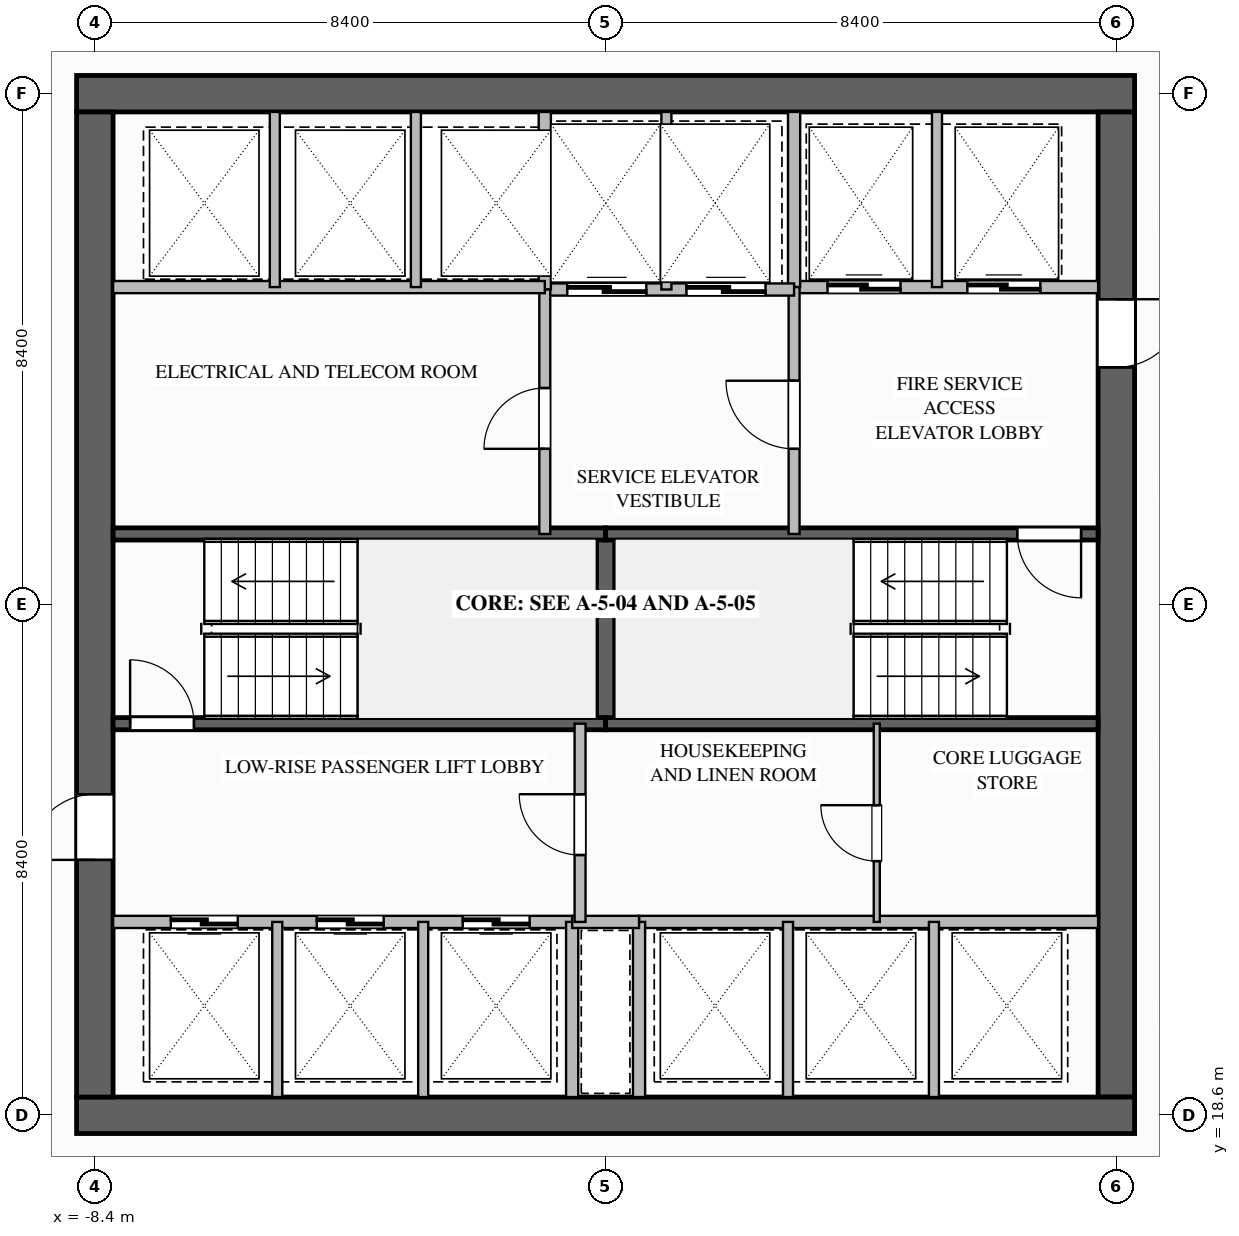
"""IFC4 building model, lengths in metres.
Left out: names, types, materials, properties, quantities, classifications, styles, units other than length and angle.
Written with IfcOpenShell. Run it as: python <this file> out.ifc"""

import sys

from ifc_helpers import new_model, si_unit, direction, frame, frame_2d, origin, place, context, subcontext, project, spatial, rectangle, extrude, element, fill, save


model = new_model("IFC4")
c1 = context("Model", 3, precision=1e-05, world=origin(), true_north=direction((0.0, 1.0)))
c2 = subcontext(c1, "Body", "Model", "MODEL_VIEW")
j1 = project(units=[si_unit("LENGTHUNIT", "METRE"), si_unit("PLANEANGLEUNIT", "RADIAN")], contexts=[c1])
p1 = place(None, origin())
s1 = spatial("IfcSite", under=j1, at=p1, CompositionType="ELEMENT")
p2 = place(p1, origin())
s2 = spatial("IfcBuilding", under=s1, at=p2, CompositionType="ELEMENT")
p3 = place(p2, frame((0.0, 0.0, 43.7)))
s3 = spatial("IfcBuildingStorey", under=s2, at=p3, CompositionType="ELEMENT", Elevation=43.7)
p4 = place(p3, frame((-8.7, 35.4, 0.0), z_axis=(0.0, 0.0, 1.0), x_axis=(1.0, 0.0, 0.0)))
e1 = element("IfcWall", 1, at=p4, inside=s3, PredefinedType="SHEAR", context=c2, shape_type="SweptSolid", body=[
    extrude(rectangle(XDim=17.4, YDim=0.6, at=frame_2d((8.7, 0.0))), origin(), (0.0, 0.0, 1.0), 3.5),
])
p5 = place(p3, frame((8.4, 35.1, 0.0), z_axis=(0.0, 0.0, 1.0), x_axis=(0.0, -1.0, 0.0)))
e2 = element("IfcWall", 2, at=p5, inside=s3, PredefinedType="SHEAR", context=c2, shape_type="SweptSolid", body=[
    extrude(rectangle(XDim=16.2, YDim=0.6, at=frame_2d((8.1, 0.0))), origin(), (0.0, 0.0, 1.0), 3.5),
])
p6 = place(p5, frame((3.08, 0.0, 0.0)))
e3 = element("IfcOpeningElement", 3, at=p6, cuts=e2, PredefinedType="OPENING", context=c2, shape_type="SweptSolid", body=[
    extrude(rectangle(XDim=1.12, YDim=2.1, at=frame_2d((0.56, 1.05))), frame((0.0, 0.31, 0.0), z_axis=(0.0, -1.0, 0.0), x_axis=(1.0, 0.0, 0.0)), (0.0, 0.0, 1.0), 0.62),
])
p7 = place(p3, frame((8.7, 18.6, 0.0), z_axis=(0.0, 0.0, 1.0), x_axis=(-1.0, 0.0, 0.0)))
e4 = element("IfcWall", 4, at=p7, inside=s3, PredefinedType="SHEAR", context=c2, shape_type="SweptSolid", body=[
    extrude(rectangle(XDim=17.4, YDim=0.6, at=frame_2d((8.7, 0.0))), origin(), (0.0, 0.0, 1.0), 3.5),
])
p8 = place(p3, frame((-8.4, 18.9, 0.0), z_axis=(0.0, 0.0, 1.0), x_axis=(0.0, 1.0, 0.0)))
e5 = element("IfcWall", 5, at=p8, inside=s3, PredefinedType="SHEAR", context=c2, shape_type="SweptSolid", body=[
    extrude(rectangle(XDim=16.2, YDim=0.6, at=frame_2d((8.1, 0.0))), origin(), (0.0, 0.0, 1.0), 3.5),
])
p9 = place(p8, frame((3.9, 0.0, 0.0)))
e6 = element("IfcOpeningElement", 6, at=p9, cuts=e5, PredefinedType="OPENING", context=c2, shape_type="SweptSolid", body=[
    extrude(rectangle(XDim=1.08, YDim=2.04, at=frame_2d((0.54, 1.02))), frame((0.0, 0.31, 0.0), z_axis=(0.0, -1.0, 0.0), x_axis=(1.0, 0.0, 0.0)), (0.0, 0.0, 1.0), 0.62),
])
p10 = place(p3, frame((0.0, 25.04, 0.0), z_axis=(0.0, 0.0, 1.0), x_axis=(0.0, 1.0, 0.0)))
e7 = element("IfcWall", 7, at=p10, inside=s3, PredefinedType="SOLIDWALL", context=c2, shape_type="SweptSolid", body=[
    extrude(rectangle(XDim=3.12, YDim=0.3, at=frame_2d((1.56, 0.0))), origin(), (0.0, 0.0, 1.0), 3.24),
])
p11 = place(p3, frame((-8.1, 25.04, 0.0), z_axis=(0.0, 0.0, 1.0), x_axis=(1.0, 0.0, 0.0)))
e8 = element("IfcWall", 8, at=p11, inside=s3, PredefinedType="SOLIDWALL", context=c2, shape_type="SweptSolid", body=[
    extrude(rectangle(XDim=8.1, YDim=0.2, at=frame_2d((4.05, 0.0))), origin(), (0.0, 0.0, 1.0), 3.24),
])
p12 = place(p11, frame((0.28, 0.0, 0.0)))
e9 = element("IfcOpeningElement", 9, at=p12, cuts=e8, PredefinedType="OPENING", context=c2, shape_type="SweptSolid", body=[
    extrude(rectangle(XDim=1.05, YDim=2.1, at=frame_2d((0.525, 1.05))), frame((0.0, 0.11, 0.0), z_axis=(0.0, -1.0, 0.0), x_axis=(1.0, 0.0, 0.0)), (0.0, 0.0, 1.0), 0.22),
])
for number, where, z_axis, x_axis in (
    (10, (-8.1, 28.16, 0.0), (0.0, 0.0, 1.0), (1.0, 0.0, 0.0)),
    (11, (0.0, 25.04, 0.0), (0.0, 0.0, 1.0), (1.0, 0.0, 0.0)),
):
    element("IfcWall", number, at=place(p3, frame(where, z_axis=z_axis, x_axis=x_axis)), inside=s3, PredefinedType="SOLIDWALL", context=c2, shape_type="SweptSolid", body=[
        extrude(rectangle(XDim=8.1, YDim=0.2, at=frame_2d((4.05, 0.0))), origin(), (0.0, 0.0, 1.0), 3.24),
    ])
p13 = place(p3, frame((8.1, 28.16, 0.0), z_axis=(0.0, 0.0, 1.0), x_axis=(-1.0, 0.0, 0.0)))
e12 = element("IfcWall", 12, at=p13, inside=s3, PredefinedType="SOLIDWALL", context=c2, shape_type="SweptSolid", body=[
    extrude(rectangle(XDim=8.1, YDim=0.2, at=frame_2d((4.05, 0.0))), origin(), (0.0, 0.0, 1.0), 3.24),
])
p14 = place(p13, frame((0.28, 0.0, 0.0)))
e13 = element("IfcOpeningElement", 13, at=p14, cuts=e12, PredefinedType="OPENING", context=c2, shape_type="SweptSolid", body=[
    extrude(rectangle(XDim=1.05, YDim=2.1, at=frame_2d((0.525, 1.05))), frame((0.0, 0.11, 0.0), z_axis=(0.0, -1.0, 0.0), x_axis=(1.0, 0.0, 0.0)), (0.0, 0.0, 1.0), 0.22),
])
p15 = place(p3, frame((3.1, 32.22, 0.0), z_axis=(0.0, 0.0, 1.0), x_axis=(1.0, 0.0, 0.0)))
e14 = element("IfcWall", 14, at=p15, inside=s3, PredefinedType="SOLIDWALL", context=c2, shape_type="SweptSolid", body=[
    extrude(rectangle(XDim=5.0, YDim=0.2, at=frame_2d((2.5, 0.0))), origin(), (0.0, 0.0, 1.0), 3.24),
])
p16 = place(p15, frame((0.55, 0.0, 0.0)))
e15 = element("IfcOpeningElement", 15, at=p16, cuts=e14, PredefinedType="OPENING", context=c2, shape_type="SweptSolid", body=[
    extrude(rectangle(XDim=1.2, YDim=2.2, at=frame_2d((0.6, 1.1))), frame((0.0, 0.11, 0.0), z_axis=(0.0, -1.0, 0.0), x_axis=(1.0, 0.0, 0.0)), (0.0, 0.0, 1.0), 0.22),
])
p17 = place(p15, frame((2.85, 0.0, 0.0)))
e16 = element("IfcOpeningElement", 16, at=p17, cuts=e14, PredefinedType="OPENING", context=c2, shape_type="SweptSolid", body=[
    extrude(rectangle(XDim=1.2, YDim=2.2, at=frame_2d((0.6, 1.1))), frame((0.0, 0.11, 0.0), z_axis=(0.0, -1.0, 0.0), x_axis=(1.0, 0.0, 0.0)), (0.0, 0.0, 1.0), 0.22),
])
p18 = place(p3, frame((3.1, 32.22, 0.0), z_axis=(0.0, 0.0, 1.0), x_axis=(0.0, 1.0, 0.0)))
e17 = element("IfcWall", 17, at=p18, inside=s3, PredefinedType="SOLIDWALL", context=c2, shape_type="SweptSolid", body=[
    extrude(rectangle(XDim=2.88, YDim=0.2, at=frame_2d((1.44, 0.0))), origin(), (0.0, 0.0, 1.0), 3.24),
])
p19 = place(p3, frame((5.45, 32.22, 0.0), z_axis=(0.0, 0.0, 1.0), x_axis=(0.0, 1.0, 0.0)))
e18 = element("IfcWall", 18, at=p19, inside=s3, PredefinedType="PARTITIONING", context=c2, shape_type="SweptSolid", body=[
    extrude(rectangle(XDim=2.88, YDim=0.165, at=frame_2d((1.44, 0.0))), origin(), (0.0, 0.0, 1.0), 3.24),
])
p20 = place(p3, frame((3.1, 28.16, 0.0), z_axis=(0.0, 0.0, 1.0), x_axis=(0.0, 1.0, 0.0)))
e19 = element("IfcWall", 19, at=p20, inside=s3, PredefinedType="SOLIDWALL", context=c2, shape_type="SweptSolid", body=[
    extrude(rectangle(XDim=4.06, YDim=0.18, at=frame_2d((2.03, 0.0))), origin(), (0.0, 0.0, 1.0), 3.24),
])
p21 = place(p20, frame((1.4, 0.0, 0.0)))
e20 = element("IfcOpeningElement", 20, at=p21, cuts=e19, PredefinedType="OPENING", context=c2, shape_type="SweptSolid", body=[
    extrude(rectangle(XDim=1.12, YDim=2.1, at=frame_2d((0.56, 1.05))), frame((0.0, 0.1, 0.0), z_axis=(0.0, -1.0, 0.0), x_axis=(1.0, 0.0, 0.0)), (0.0, 0.0, 1.0), 0.2),
])
p22 = place(p3, frame((-1.0, 32.18, 0.0), z_axis=(0.0, 0.0, 1.0), x_axis=(1.0, 0.0, 0.0)))
e21 = element("IfcWall", 21, at=p22, inside=s3, PredefinedType="SOLIDWALL", context=c2, shape_type="SweptSolid", body=[
    extrude(rectangle(XDim=4.1, YDim=0.2, at=frame_2d((2.05, 0.0))), origin(), (0.0, 0.0, 1.0), 3.24),
])
p23 = place(p22, frame((0.37, 0.0, 0.0)))
e22 = element("IfcOpeningElement", 22, at=p23, cuts=e21, PredefinedType="OPENING", context=c2, shape_type="SweptSolid", body=[
    extrude(rectangle(XDim=1.3, YDim=2.2, at=frame_2d((0.65, 1.1))), frame((0.0, 0.11, 0.0), z_axis=(0.0, -1.0, 0.0), x_axis=(1.0, 0.0, 0.0)), (0.0, 0.0, 1.0), 0.22),
])
p24 = place(p22, frame((2.33, 0.0, 0.0)))
e23 = element("IfcOpeningElement", 23, at=p24, cuts=e21, PredefinedType="OPENING", context=c2, shape_type="SweptSolid", body=[
    extrude(rectangle(XDim=1.3, YDim=2.2, at=frame_2d((0.65, 1.1))), frame((0.0, 0.11, 0.0), z_axis=(0.0, -1.0, 0.0), x_axis=(1.0, 0.0, 0.0)), (0.0, 0.0, 1.0), 0.22),
])
p25 = place(p3, frame((-1.0, 32.18, 0.0), z_axis=(0.0, 0.0, 1.0), x_axis=(0.0, 1.0, 0.0)))
e24 = element("IfcWall", 24, at=p25, inside=s3, PredefinedType="SOLIDWALL", context=c2, shape_type="SweptSolid", body=[
    extrude(rectangle(XDim=2.92, YDim=0.2, at=frame_2d((1.46, 0.0))), origin(), (0.0, 0.0, 1.0), 3.24),
])
p26 = place(p3, frame((1.0, 32.18, 0.0), z_axis=(0.0, 0.0, 1.0), x_axis=(0.0, 1.0, 0.0)))
e25 = element("IfcWall", 25, at=p26, inside=s3, PredefinedType="PARTITIONING", context=c2, shape_type="SweptSolid", body=[
    extrude(rectangle(XDim=2.92, YDim=0.165, at=frame_2d((1.46, 0.0))), origin(), (0.0, 0.0, 1.0), 3.24),
])
p27 = place(p3, frame((-1.0, 28.16, 0.0), z_axis=(0.0, 0.0, 1.0), x_axis=(0.0, 1.0, 0.0)))
e26 = element("IfcWall", 26, at=p27, inside=s3, PredefinedType="SOLIDWALL", context=c2, shape_type="SweptSolid", body=[
    extrude(rectangle(XDim=4.02, YDim=0.18, at=frame_2d((2.01, 0.0))), origin(), (0.0, 0.0, 1.0), 3.24),
])
p28 = place(p27, frame((1.4, 0.0, 0.0)))
e27 = element("IfcOpeningElement", 27, at=p28, cuts=e26, PredefinedType="OPENING", context=c2, shape_type="SweptSolid", body=[
    extrude(rectangle(XDim=1.0, YDim=2.1, at=frame_2d((0.5, 1.05))), frame((0.0, 0.1, 0.0), z_axis=(0.0, -1.0, 0.0), x_axis=(1.0, 0.0, 0.0)), (0.0, 0.0, 1.0), 0.2),
])
p29 = place(p3, frame((-8.1, 32.22, 0.0), z_axis=(0.0, 0.0, 1.0), x_axis=(1.0, 0.0, 0.0)))
e28 = element("IfcWall", 28, at=p29, inside=s3, PredefinedType="SOLIDWALL", context=c2, shape_type="SweptSolid", body=[
    extrude(rectangle(XDim=7.1, YDim=0.2, at=frame_2d((3.55, 0.0))), origin(), (0.0, 0.0, 1.0), 3.24),
])
for number, where, z_axis, x_axis in (
    (29, (-5.44, 32.22, 0.0), (0.0, 0.0, 1.0), (0.0, 1.0, 0.0)),
    (30, (-3.12, 32.22, 0.0), (0.0, 0.0, 1.0), (0.0, 1.0, 0.0)),
):
    element("IfcWall", number, at=place(p3, frame(where, z_axis=z_axis, x_axis=x_axis)), inside=s3, PredefinedType="PARTITIONING", context=c2, shape_type="SweptSolid", body=[
        extrude(rectangle(XDim=2.88, YDim=0.165, at=frame_2d((1.44, 0.0))), origin(), (0.0, 0.0, 1.0), 3.24),
    ])
p30 = place(p3, frame((-0.55, 21.78, 0.0), z_axis=(0.0, 0.0, 1.0), x_axis=(-1.0, 0.0, 0.0)))
e31 = element("IfcWall", 31, at=p30, inside=s3, PredefinedType="SOLIDWALL", context=c2, shape_type="SweptSolid", body=[
    extrude(rectangle(XDim=7.55, YDim=0.2, at=frame_2d((3.775, 0.0))), origin(), (0.0, 0.0, 1.0), 3.24),
])
p31 = place(p30, frame((5.5, 0.0, 0.0)))
e32 = element("IfcOpeningElement", 32, at=p31, cuts=e31, PredefinedType="OPENING", context=c2, shape_type="SweptSolid", body=[
    extrude(rectangle(XDim=1.1, YDim=2.2, at=frame_2d((0.55, 1.1))), frame((0.0, 0.11, 0.0), z_axis=(0.0, -1.0, 0.0), x_axis=(1.0, 0.0, 0.0)), (0.0, 0.0, 1.0), 0.22),
])
p32 = place(p30, frame((3.1, 0.0, 0.0)))
e33 = element("IfcOpeningElement", 33, at=p32, cuts=e31, PredefinedType="OPENING", context=c2, shape_type="SweptSolid", body=[
    extrude(rectangle(XDim=1.1, YDim=2.2, at=frame_2d((0.55, 1.1))), frame((0.0, 0.11, 0.0), z_axis=(0.0, -1.0, 0.0), x_axis=(1.0, 0.0, 0.0)), (0.0, 0.0, 1.0), 0.22),
])
p33 = place(p30, frame((0.7, 0.0, 0.0)))
e34 = element("IfcOpeningElement", 34, at=p33, cuts=e31, PredefinedType="OPENING", context=c2, shape_type="SweptSolid", body=[
    extrude(rectangle(XDim=1.1, YDim=2.2, at=frame_2d((0.55, 1.1))), frame((0.0, 0.11, 0.0), z_axis=(0.0, -1.0, 0.0), x_axis=(1.0, 0.0, 0.0)), (0.0, 0.0, 1.0), 0.22),
])
for number, where, z_axis, x_axis in (
    (35, (-5.4, 18.9, 0.0), (0.0, 0.0, 1.0), (0.0, 1.0, 0.0)),
    (36, (-3.0, 18.9, 0.0), (0.0, 0.0, 1.0), (0.0, 1.0, 0.0)),
):
    element("IfcWall", number, at=place(p3, frame(where, z_axis=z_axis, x_axis=x_axis)), inside=s3, PredefinedType="PARTITIONING", context=c2, shape_type="SweptSolid", body=[
        extrude(rectangle(XDim=2.88, YDim=0.165, at=frame_2d((1.44, 0.0))), origin(), (0.0, 0.0, 1.0), 3.24),
    ])
p34 = place(p3, frame((-0.55, 18.9, 0.0), z_axis=(0.0, 0.0, 1.0), x_axis=(0.0, 1.0, 0.0)))
e37 = element("IfcWall", 37, at=p34, inside=s3, PredefinedType="SOLIDWALL", context=c2, shape_type="SweptSolid", body=[
    extrude(rectangle(XDim=2.88, YDim=0.2, at=frame_2d((1.44, 0.0))), origin(), (0.0, 0.0, 1.0), 3.24),
])
p35 = place(p3, frame((8.1, 21.78, 0.0), z_axis=(0.0, 0.0, 1.0), x_axis=(-1.0, 0.0, 0.0)))
e38 = element("IfcWall", 38, at=p35, inside=s3, PredefinedType="SOLIDWALL", context=c2, shape_type="SweptSolid", body=[
    extrude(rectangle(XDim=7.55, YDim=0.2, at=frame_2d((3.775, 0.0))), origin(), (0.0, 0.0, 1.0), 3.24),
])
p36 = place(p3, frame((0.55, 18.9, 0.0), z_axis=(0.0, 0.0, 1.0), x_axis=(0.0, 1.0, 0.0)))
e39 = element("IfcWall", 39, at=p36, inside=s3, PredefinedType="SOLIDWALL", context=c2, shape_type="SweptSolid", body=[
    extrude(rectangle(XDim=2.88, YDim=0.2, at=frame_2d((1.44, 0.0))), origin(), (0.0, 0.0, 1.0), 3.24),
])
for number, where, z_axis, x_axis in (
    (40, (3.0, 18.9, 0.0), (0.0, 0.0, 1.0), (0.0, 1.0, 0.0)),
    (41, (5.4, 18.9, 0.0), (0.0, 0.0, 1.0), (0.0, 1.0, 0.0)),
):
    element("IfcWall", number, at=place(p3, frame(where, z_axis=z_axis, x_axis=x_axis)), inside=s3, PredefinedType="PARTITIONING", context=c2, shape_type="SweptSolid", body=[
        extrude(rectangle(XDim=2.88, YDim=0.165, at=frame_2d((1.44, 0.0))), origin(), (0.0, 0.0, 1.0), 3.24),
    ])
p37 = place(p3, frame((-0.55, 21.78, 0.0), z_axis=(0.0, 0.0, 1.0), x_axis=(1.0, 0.0, 0.0)))
e42 = element("IfcWall", 42, at=p37, inside=s3, PredefinedType="SOLIDWALL", context=c2, shape_type="SweptSolid", body=[
    extrude(rectangle(XDim=1.1, YDim=0.2, at=frame_2d((0.55, 0.0))), origin(), (0.0, 0.0, 1.0), 3.24),
])
p38 = place(p3, frame((-0.42, 21.78, 0.0), z_axis=(0.0, 0.0, 1.0), x_axis=(0.0, 1.0, 0.0)))
e43 = element("IfcWall", 43, at=p38, inside=s3, PredefinedType="SOLIDWALL", context=c2, shape_type="SweptSolid", body=[
    extrude(rectangle(XDim=3.26, YDim=0.18, at=frame_2d((1.63, 0.0))), origin(), (0.0, 0.0, 1.0), 3.24),
])
p39 = place(p38, frame((1.1, 0.0, 0.0)))
e44 = element("IfcOpeningElement", 44, at=p39, cuts=e43, PredefinedType="OPENING", context=c2, shape_type="SweptSolid", body=[
    extrude(rectangle(XDim=1.0, YDim=2.1, at=frame_2d((0.5, 1.05))), frame((0.0, 0.1, 0.0), z_axis=(0.0, -1.0, 0.0), x_axis=(1.0, 0.0, 0.0)), (0.0, 0.0, 1.0), 0.2),
])
p40 = place(p3, frame((4.46, 21.78, 0.0), z_axis=(0.0, 0.0, 1.0), x_axis=(0.0, 1.0, 0.0)))
e45 = element("IfcWall", 45, at=p40, inside=s3, PredefinedType="PARTITIONING", context=c2, shape_type="SweptSolid", body=[
    extrude(rectangle(XDim=3.26, YDim=0.1, at=frame_2d((1.63, 0.0))), origin(), (0.0, 0.0, 1.0), 3.24),
])
p41 = place(p40, frame((1.0, 0.0, 0.0)))
e46 = element("IfcOpeningElement", 46, at=p41, cuts=e45, PredefinedType="OPENING", context=c2, shape_type="SweptSolid", body=[
    extrude(rectangle(XDim=0.92, YDim=2.1, at=frame_2d((0.46, 1.05))), frame((0.0, 0.06, 0.0), z_axis=(0.0, -1.0, 0.0), x_axis=(1.0, 0.0, 0.0)), (0.0, 0.0, 1.0), 0.12),
])
p42 = place(p12, origin())
e47 = element("IfcDoor", 47, at=p42, inside=s3, OperationType="SINGLE_SWING_LEFT", PredefinedType="DOOR", context=c2, shape_type="SweptSolid", body=[
    extrude(rectangle(XDim=1.05, YDim=2.1, at=frame_2d((0.525, 1.05))), frame((0.0, 0.025, 0.0), z_axis=(0.0, -1.0, 0.0), x_axis=(1.0, 0.0, 0.0)), (0.0, 0.0, 1.0), 0.05),
])
fill(e9, e47)
p43 = place(p14, origin())
e48 = element("IfcDoor", 48, at=p43, inside=s3, OperationType="SINGLE_SWING_LEFT", PredefinedType="DOOR", context=c2, shape_type="SweptSolid", body=[
    extrude(rectangle(XDim=1.05, YDim=2.1, at=frame_2d((0.525, 1.05))), frame((0.0, 0.025, 0.0), z_axis=(0.0, -1.0, 0.0), x_axis=(1.0, 0.0, 0.0)), (0.0, 0.0, 1.0), 0.05),
])
fill(e13, e48)
p44 = place(p16, origin())
e49 = element("IfcDoor", 49, at=p44, inside=s3, OperationType="SLIDING_TO_LEFT", PredefinedType="DOOR", context=c2, shape_type="SweptSolid", body=[
    extrude(rectangle(XDim=1.2, YDim=2.2, at=frame_2d((0.6, 1.1))), frame((0.0, 0.025, 0.0), z_axis=(0.0, -1.0, 0.0), x_axis=(1.0, 0.0, 0.0)), (0.0, 0.0, 1.0), 0.05),
])
fill(e15, e49)
p45 = place(p17, origin())
e50 = element("IfcDoor", 50, at=p45, inside=s3, OperationType="SLIDING_TO_LEFT", PredefinedType="DOOR", context=c2, shape_type="SweptSolid", body=[
    extrude(rectangle(XDim=1.2, YDim=2.2, at=frame_2d((0.6, 1.1))), frame((0.0, 0.025, 0.0), z_axis=(0.0, -1.0, 0.0), x_axis=(1.0, 0.0, 0.0)), (0.0, 0.0, 1.0), 0.05),
])
fill(e16, e50)
p46 = place(p21, origin())
e51 = element("IfcDoor", 51, at=p46, inside=s3, OperationType="SINGLE_SWING_RIGHT", PredefinedType="DOOR", context=c2, shape_type="SweptSolid", body=[
    extrude(rectangle(XDim=1.12, YDim=2.1, at=frame_2d((0.56, 1.05))), frame((0.0, 0.025, 0.0), z_axis=(0.0, -1.0, 0.0), x_axis=(1.0, 0.0, 0.0)), (0.0, 0.0, 1.0), 0.05),
])
fill(e20, e51)
p47 = place(p6, origin())
e52 = element("IfcDoor", 52, at=p47, inside=s3, OperationType="SINGLE_SWING_LEFT", PredefinedType="DOOR", context=c2, shape_type="SweptSolid", body=[
    extrude(rectangle(XDim=1.12, YDim=2.1, at=frame_2d((0.56, 1.05))), frame((0.0, 0.025, 0.0), z_axis=(0.0, -1.0, 0.0), x_axis=(1.0, 0.0, 0.0)), (0.0, 0.0, 1.0), 0.05),
])
fill(e3, e52)
p48 = place(p23, origin())
e53 = element("IfcDoor", 53, at=p48, inside=s3, OperationType="SLIDING_TO_LEFT", PredefinedType="DOOR", context=c2, shape_type="SweptSolid", body=[
    extrude(rectangle(XDim=1.3, YDim=2.2, at=frame_2d((0.65, 1.1))), frame((0.0, 0.025, 0.0), z_axis=(0.0, -1.0, 0.0), x_axis=(1.0, 0.0, 0.0)), (0.0, 0.0, 1.0), 0.05),
])
fill(e22, e53)
p49 = place(p24, origin())
e54 = element("IfcDoor", 54, at=p49, inside=s3, OperationType="SLIDING_TO_LEFT", PredefinedType="DOOR", context=c2, shape_type="SweptSolid", body=[
    extrude(rectangle(XDim=1.3, YDim=2.2, at=frame_2d((0.65, 1.1))), frame((0.0, 0.025, 0.0), z_axis=(0.0, -1.0, 0.0), x_axis=(1.0, 0.0, 0.0)), (0.0, 0.0, 1.0), 0.05),
])
fill(e23, e54)
p50 = place(p28, origin())
e55 = element("IfcDoor", 55, at=p50, inside=s3, OperationType="SINGLE_SWING_LEFT", PredefinedType="DOOR", context=c2, shape_type="SweptSolid", body=[
    extrude(rectangle(XDim=1.0, YDim=2.1, at=frame_2d((0.5, 1.05))), frame((0.0, 0.025, 0.0), z_axis=(0.0, -1.0, 0.0), x_axis=(1.0, 0.0, 0.0)), (0.0, 0.0, 1.0), 0.05),
])
fill(e27, e55)
p51 = place(p31, origin())
e56 = element("IfcDoor", 56, at=p51, inside=s3, OperationType="SLIDING_TO_LEFT", PredefinedType="DOOR", context=c2, shape_type="SweptSolid", body=[
    extrude(rectangle(XDim=1.1, YDim=2.2, at=frame_2d((0.55, 1.1))), frame((0.0, 0.025, 0.0), z_axis=(0.0, -1.0, 0.0), x_axis=(1.0, 0.0, 0.0)), (0.0, 0.0, 1.0), 0.05),
])
fill(e32, e56)
p52 = place(p32, origin())
e57 = element("IfcDoor", 57, at=p52, inside=s3, OperationType="SLIDING_TO_LEFT", PredefinedType="DOOR", context=c2, shape_type="SweptSolid", body=[
    extrude(rectangle(XDim=1.1, YDim=2.2, at=frame_2d((0.55, 1.1))), frame((0.0, 0.025, 0.0), z_axis=(0.0, -1.0, 0.0), x_axis=(1.0, 0.0, 0.0)), (0.0, 0.0, 1.0), 0.05),
])
fill(e33, e57)
p53 = place(p33, origin())
e58 = element("IfcDoor", 58, at=p53, inside=s3, OperationType="SLIDING_TO_LEFT", PredefinedType="DOOR", context=c2, shape_type="SweptSolid", body=[
    extrude(rectangle(XDim=1.1, YDim=2.2, at=frame_2d((0.55, 1.1))), frame((0.0, 0.025, 0.0), z_axis=(0.0, -1.0, 0.0), x_axis=(1.0, 0.0, 0.0)), (0.0, 0.0, 1.0), 0.05),
])
fill(e34, e58)
p54 = place(p39, origin())
e59 = element("IfcDoor", 59, at=p54, inside=s3, OperationType="SINGLE_SWING_RIGHT", PredefinedType="DOOR", context=c2, shape_type="SweptSolid", body=[
    extrude(rectangle(XDim=1.0, YDim=2.1, at=frame_2d((0.5, 1.05))), frame((0.0, 0.025, 0.0), z_axis=(0.0, -1.0, 0.0), x_axis=(1.0, 0.0, 0.0)), (0.0, 0.0, 1.0), 0.05),
])
fill(e44, e59)
p55 = place(p9, origin())
e60 = element("IfcDoor", 60, at=p55, inside=s3, OperationType="SINGLE_SWING_LEFT", PredefinedType="DOOR", context=c2, shape_type="SweptSolid", body=[
    extrude(rectangle(XDim=1.08, YDim=2.04, at=frame_2d((0.54, 1.02))), frame((0.0, 0.025, 0.0), z_axis=(0.0, -1.0, 0.0), x_axis=(1.0, 0.0, 0.0)), (0.0, 0.0, 1.0), 0.05),
])
fill(e6, e60)
p56 = place(p41, origin())
e61 = element("IfcDoor", 61, at=p56, inside=s3, OperationType="SINGLE_SWING_RIGHT", PredefinedType="DOOR", context=c2, shape_type="SweptSolid", body=[
    extrude(rectangle(XDim=0.92, YDim=2.1, at=frame_2d((0.46, 1.05))), frame((0.0, 0.025, 0.0), z_axis=(0.0, -1.0, 0.0), x_axis=(1.0, 0.0, 0.0)), (0.0, 0.0, 1.0), 0.05),
])
fill(e46, e61)
save(model, sys.argv[1])
